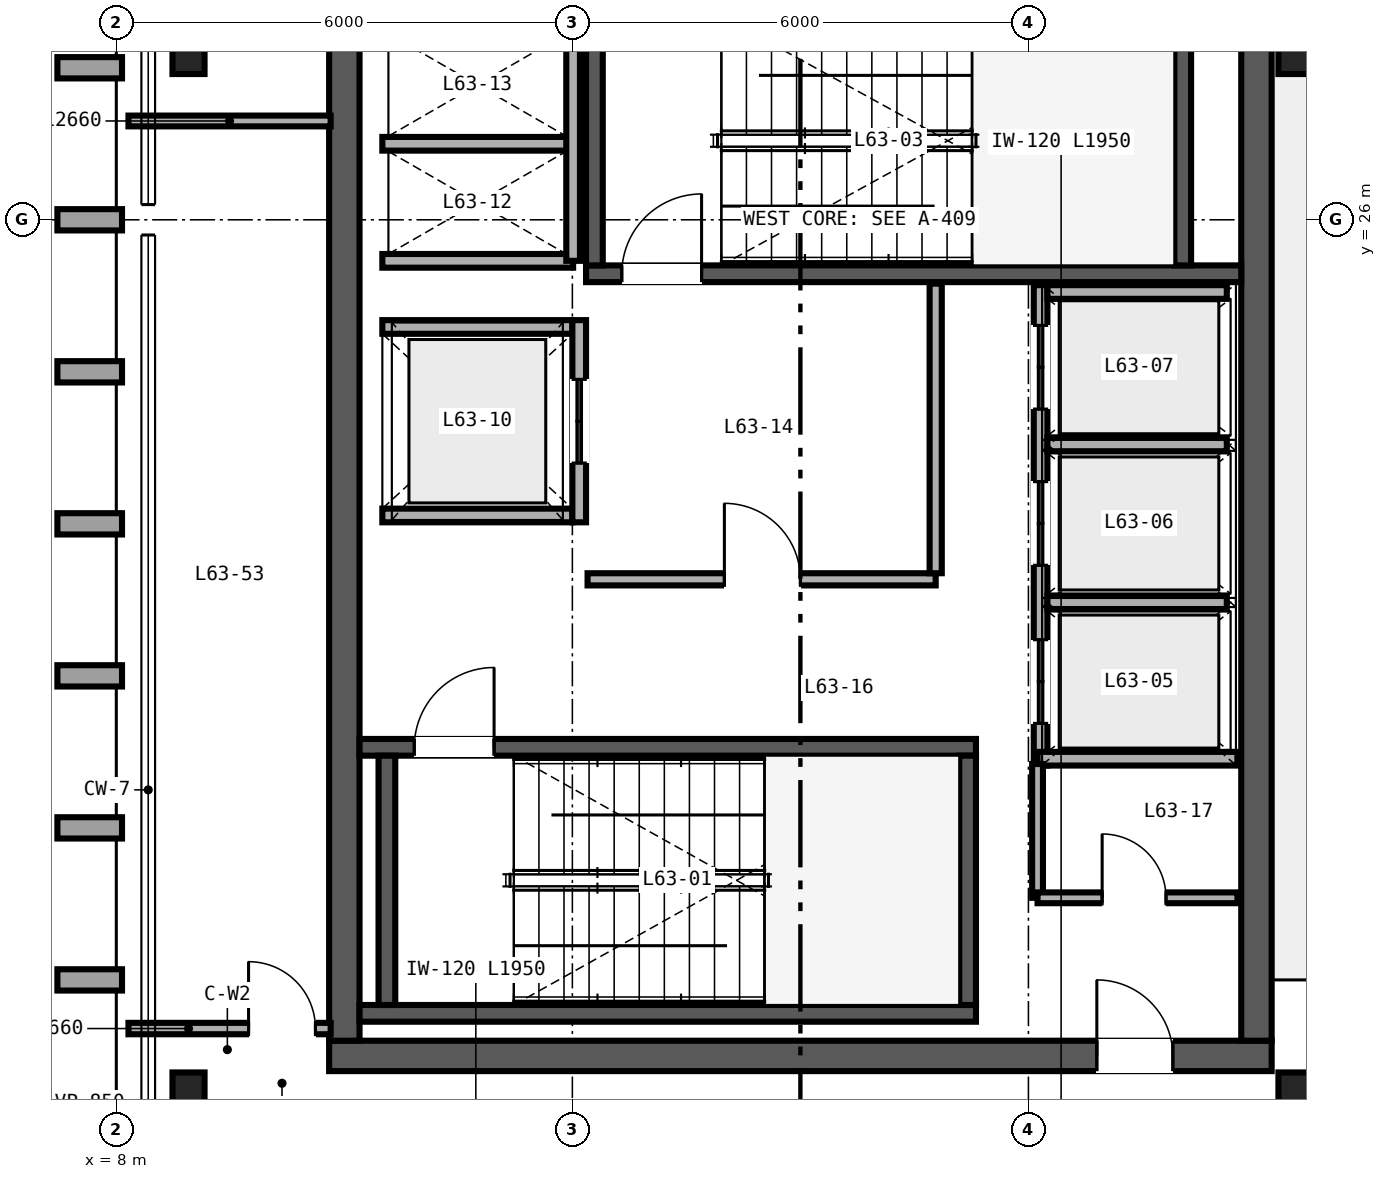
"""IFC4 building model, lengths in metres.
Left out: names, types, materials, properties, quantities, classifications, styles, units other than length and angle.
Written with IfcOpenShell. Run it as: python <this file> out.ifc"""

import sys

from ifc_helpers import new_model, si_unit, direction, frame, frame_2d, origin, origin_2d, place, context, subcontext, project, spatial, rectangle, i_section, extrude, source, transform, mapped, element, fill, save


model = new_model("IFC4")
c1 = context("Model", 3, precision=1e-05, world=origin(), true_north=direction((0.0, 1.0)))
c2 = subcontext(c1, "Body", "Model", "MODEL_VIEW")
j1 = project(units=[si_unit("LENGTHUNIT", "METRE"), si_unit("PLANEANGLEUNIT", "RADIAN")], contexts=[c1])
p1 = place(None, origin())
s1 = spatial("IfcSite", under=j1, at=p1, CompositionType="ELEMENT")
p2 = place(p1, origin())
s2 = spatial("IfcBuilding", under=s1, at=p2, CompositionType="ELEMENT")
p3 = place(p2, frame((0.0, 0.0, 250.8)))
s3 = spatial("IfcBuildingStorey", under=s2, at=p3, CompositionType="ELEMENT", Elevation=250.8)
p4 = place(p3, frame((10.8, 15.0, 0.0), z_axis=(0.0, 0.0, 1.0), x_axis=(1.0, 0.0, 0.0)))
e1 = element("IfcWall", 1, at=p4, inside=s3, PredefinedType="SHEAR", context=c2, shape_type="SweptSolid", body=[
    extrude(rectangle(XDim=12.4, YDim=0.4, at=frame_2d((6.2, 0.0))), origin(), (0.0, 0.0, 1.0), 3.38),
])
p5 = place(p4, frame((10.1, 0.0, 0.0)))
e2 = element("IfcOpeningElement", 2, at=p5, cuts=e1, PredefinedType="OPENING", context=c2, shape_type="SweptSolid", body=[
    extrude(rectangle(XDim=1.0, YDim=2.15, at=frame_2d((0.5, 1.075))), frame((0.0, 0.21, 0.0), z_axis=(0.0, -1.0, 0.0), x_axis=(1.0, 0.0, 0.0)), (0.0, 0.0, 1.0), 0.42),
])
for number, where, z_axis, x_axis in (
    (3, (11.0, 15.2, 0.0), (0.0, 0.0, 1.0), (0.0, 1.0, 0.0)),
    (4, (23.0, 15.2, 0.0), (0.0, 0.0, 1.0), (0.0, 1.0, 0.0)),
):
    element("IfcWall", number, at=place(p3, frame(where, z_axis=z_axis, x_axis=x_axis)), inside=s3, PredefinedType="SHEAR", context=c2, shape_type="SweptSolid", body=[
        extrude(rectangle(XDim=21.6, YDim=0.4, at=frame_2d((10.8, 0.0))), origin(), (0.0, 0.0, 1.0), 3.38),
    ])
p6 = place(p3, frame((11.2, 15.56, 0.0), z_axis=(0.0, 0.0, 1.0), x_axis=(1.0, 0.0, 0.0)))
e5 = element("IfcWall", 5, at=p6, inside=s3, PredefinedType="SHEAR", context=c2, shape_type="SweptSolid", body=[
    extrude(rectangle(XDim=8.11, YDim=0.22, at=frame_2d((4.055, 0.0))), origin(), (0.0, 0.0, 1.0), 3.4),
])
p7 = place(p3, frame((11.2, 19.06, 0.0), z_axis=(0.0, 0.0, 1.0), x_axis=(1.0, 0.0, 0.0)))
e6 = element("IfcWall", 6, at=p7, inside=s3, PredefinedType="SHEAR", context=c2, shape_type="SweptSolid", body=[
    extrude(rectangle(XDim=8.11, YDim=0.22, at=frame_2d((4.055, 0.0))), origin(), (0.0, 0.0, 1.0), 3.4),
])
p8 = place(p7, frame((0.72, 0.0, 0.0)))
e7 = element("IfcOpeningElement", 7, at=p8, cuts=e6, PredefinedType="OPENING", context=c2, shape_type="SweptSolid", body=[
    extrude(rectangle(XDim=1.05, YDim=2.15, at=frame_2d((0.525, 1.075))), frame((0.0, 0.12, 0.0), z_axis=(0.0, -1.0, 0.0), x_axis=(1.0, 0.0, 0.0)), (0.0, 0.0, 1.0), 0.24),
])
for number, where, z_axis, x_axis in (
    (8, (11.56, 15.67, 0.0), (0.0, 0.0, 1.0), (0.0, 1.0, 0.0)),
    (9, (19.2, 15.67, 0.0), (0.0, 0.0, 1.0), (0.0, 1.0, 0.0)),
):
    element("IfcWall", number, at=place(p3, frame(where, z_axis=z_axis, x_axis=x_axis)), inside=s3, PredefinedType="SHEAR", context=c2, shape_type="SweptSolid", body=[
        extrude(rectangle(XDim=3.28, YDim=0.22, at=frame_2d((1.64, 0.0))), origin(), (0.0, 0.0, 1.0), 3.4),
    ])
p9 = place(p3, frame((14.18, 25.29, 0.0), z_axis=(0.0, 0.0, 1.0), x_axis=(1.0, 0.0, 0.0)))
e10 = element("IfcWall", 10, at=p9, inside=s3, PredefinedType="SHEAR", context=c2, shape_type="SweptSolid", body=[
    extrude(rectangle(XDim=8.62, YDim=0.22, at=frame_2d((4.31, 0.0))), origin(), (0.0, 0.0, 1.0), 3.4),
])
p10 = place(p9, frame((0.47, 0.0, 0.0)))
e11 = element("IfcOpeningElement", 11, at=p10, cuts=e10, PredefinedType="OPENING", context=c2, shape_type="SweptSolid", body=[
    extrude(rectangle(XDim=1.05, YDim=2.15, at=frame_2d((0.525, 1.075))), frame((0.0, 0.12, 0.0), z_axis=(0.0, -1.0, 0.0), x_axis=(1.0, 0.0, 0.0)), (0.0, 0.0, 1.0), 0.24),
])
for number, where, z_axis, x_axis in (
    (12, (14.29, 25.4, 0.0), (0.0, 0.0, 1.0), (0.0, 1.0, 0.0)),
    (13, (22.03, 25.4, 0.0), (0.0, 0.0, 1.0), (0.0, 1.0, 0.0)),
):
    element("IfcWall", number, at=place(p3, frame(where, z_axis=z_axis, x_axis=x_axis)), inside=s3, PredefinedType="SHEAR", context=c2, shape_type="SweptSolid", body=[
        extrude(rectangle(XDim=3.28, YDim=0.22, at=frame_2d((1.64, 0.0))), origin(), (0.0, 0.0, 1.0), 3.4),
    ])
m1 = source(origin(), c2, "Body", "SweptSolid", [
    extrude(i_section(OverallWidth=0.422, OverallDepth=0.465, WebThickness=0.045, FlangeThickness=0.073, FilletRadius=0.025, at=origin_2d()), origin(), (0.0, 0.0, 1.0), 3.38),
])
for number, where, z_axis, x_axis in (
    (14, (8.95, 14.55, 0.0), (0.0, 0.0, 1.0), (1.0, 0.0, 0.0)),
    (15, (23.5, 14.55, 0.0), (0.0, 0.0, 1.0), (1.0, 0.0, 0.0)),
    (16, (8.95, 28.15, 0.0), (0.0, 0.0, 1.0), (1.0, 0.0, 0.0)),
    (17, (23.5, 28.15, 0.0), (0.0, 0.0, 1.0), (1.0, 0.0, 0.0)),
):
    element("IfcColumn", number, at=place(p3, frame(where, z_axis=z_axis, x_axis=x_axis)), inside=s3, PredefinedType="COLUMN", context=c2, shape_type="MappedRepresentation", body=[
        mapped(m1, transform((0.0, 0.0, 0.0), scale=1.0)),
    ])
p11 = place(p3, frame((20.16, 18.82, 0.0), z_axis=(0.0, 0.0, 1.0), x_axis=(0.0, 1.0, 0.0)))
e18 = element("IfcWall", 18, at=p11, inside=s3, PredefinedType="SOLIDWALL", context=c2, shape_type="SweptSolid", body=[
    extrude(rectangle(XDim=6.32, YDim=0.18, at=frame_2d((3.16, 0.0))), origin(), (0.0, 0.0, 1.0), 2.48),
])
p12 = place(p11, frame((0.555, 0.0, 0.0)))
e19 = element("IfcOpeningElement", 19, at=p12, cuts=e18, PredefinedType="OPENING", context=c2, shape_type="SweptSolid", body=[
    extrude(rectangle(XDim=1.1, YDim=2.2, at=frame_2d((0.55, 1.1))), frame((0.0, 0.1, 0.0), z_axis=(0.0, -1.0, 0.0), x_axis=(1.0, 0.0, 0.0)), (0.0, 0.0, 1.0), 0.2),
])
p13 = place(p11, frame((2.635, 0.0, 0.0)))
e20 = element("IfcOpeningElement", 20, at=p13, cuts=e18, PredefinedType="OPENING", context=c2, shape_type="SweptSolid", body=[
    extrude(rectangle(XDim=1.1, YDim=2.2, at=frame_2d((0.55, 1.1))), frame((0.0, 0.1, 0.0), z_axis=(0.0, -1.0, 0.0), x_axis=(1.0, 0.0, 0.0)), (0.0, 0.0, 1.0), 0.2),
])
p14 = place(p11, frame((4.69, 0.0, 0.0)))
e21 = element("IfcOpeningElement", 21, at=p14, cuts=e18, PredefinedType="OPENING", context=c2, shape_type="SweptSolid", body=[
    extrude(rectangle(XDim=1.1, YDim=2.2, at=frame_2d((0.55, 1.1))), frame((0.0, 0.1, 0.0), z_axis=(0.0, -1.0, 0.0), x_axis=(1.0, 0.0, 0.0)), (0.0, 0.0, 1.0), 0.2),
])
p15 = place(p3, frame((20.12, 18.91, 0.0), z_axis=(0.0, 0.0, 1.0), x_axis=(1.0, 0.0, 0.0)))
e22 = element("IfcWall", 22, at=p15, inside=s3, PredefinedType="SOLIDWALL", context=c2, shape_type="SweptSolid", body=[
    extrude(rectangle(XDim=2.63, YDim=0.18, at=frame_2d((1.315, 0.0))), origin(), (0.0, 0.0, 1.0), 3.38),
])
p16 = place(p3, frame((20.25, 25.05, 0.0), z_axis=(0.0, 0.0, 1.0), x_axis=(1.0, 0.0, 0.0)))
e23 = element("IfcWall", 23, at=p16, inside=s3, PredefinedType="SOLIDWALL", context=c2, shape_type="SweptSolid", body=[
    extrude(rectangle(XDim=2.36, YDim=0.18, at=frame_2d((1.18, 0.0))), origin(), (0.0, 0.0, 1.0), 3.38),
])
p17 = place(p3, frame((20.25, 20.965, 0.0), z_axis=(0.0, 0.0, 1.0), x_axis=(1.0, 0.0, 0.0)))
e24 = element("IfcWall", 24, at=p17, inside=s3, PredefinedType="SOLIDWALL", context=c2, shape_type="SweptSolid", body=[
    extrude(rectangle(XDim=2.36, YDim=0.18, at=frame_2d((1.18, 0.0))), origin(), (0.0, 0.0, 1.0), 2.48),
])
p18 = place(p3, frame((20.25, 23.045, 0.0), z_axis=(0.0, 0.0, 1.0), x_axis=(1.0, 0.0, 0.0)))
e25 = element("IfcWall", 25, at=p18, inside=s3, PredefinedType="SOLIDWALL", context=c2, shape_type="SweptSolid", body=[
    extrude(rectangle(XDim=2.36, YDim=0.18, at=frame_2d((1.18, 0.0))), origin(), (0.0, 0.0, 1.0), 3.38),
])
for number, where, z_axis, x_axis in (
    (26, (11.5, 22.11, 0.0), (0.0, 0.0, 1.0), (1.0, 0.0, 0.0)),
    (27, (11.5, 24.59, 0.0), (0.0, 0.0, 1.0), (1.0, 0.0, 0.0)),
):
    element("IfcWall", number, at=place(p3, frame(where, z_axis=z_axis, x_axis=x_axis)), inside=s3, PredefinedType="SOLIDWALL", context=c2, shape_type="SweptSolid", body=[
        extrude(rectangle(XDim=2.5, YDim=0.18, at=frame_2d((1.25, 0.0))), origin(), (0.0, 0.0, 1.0), 3.38),
    ])
p19 = place(p3, frame((14.09, 22.02, 0.0), z_axis=(0.0, 0.0, 1.0), x_axis=(0.0, 1.0, 0.0)))
e28 = element("IfcWall", 28, at=p19, inside=s3, PredefinedType="SOLIDWALL", context=c2, shape_type="SweptSolid", body=[
    extrude(rectangle(XDim=2.66, YDim=0.18, at=frame_2d((1.33, 0.0))), origin(), (0.0, 0.0, 1.0), 3.38),
])
p20 = place(p19, frame((0.78, 0.0, 0.0)))
e29 = element("IfcOpeningElement", 29, at=p20, cuts=e28, PredefinedType="OPENING", context=c2, shape_type="SweptSolid", body=[
    extrude(rectangle(XDim=1.1, YDim=2.2, at=frame_2d((0.55, 1.1))), frame((0.0, 0.1, 0.0), z_axis=(0.0, -1.0, 0.0), x_axis=(1.0, 0.0, 0.0)), (0.0, 0.0, 1.0), 0.2),
])
for number, where, z_axis, x_axis in (
    (30, (11.5, 25.46, 0.0), (0.0, 0.0, 1.0), (1.0, 0.0, 0.0)),
    (31, (11.5, 27.0, 0.0), (0.0, 0.0, 1.0), (1.0, 0.0, 0.0)),
):
    element("IfcWall", number, at=place(p3, frame(where, z_axis=z_axis, x_axis=x_axis)), inside=s3, PredefinedType="SOLIDWALL", context=c2, shape_type="SweptSolid", body=[
        extrude(rectangle(XDim=2.51, YDim=0.18, at=frame_2d((1.255, 0.0))), origin(), (0.0, 0.0, 1.0), 3.38),
    ])
p21 = place(p3, frame((14.01, 25.46, 0.0), z_axis=(0.0, 0.0, 1.0), x_axis=(0.0, 1.0, 0.0)))
e32 = element("IfcWall", 32, at=p21, inside=s3, PredefinedType="SOLIDWALL", context=c2, shape_type="SweptSolid", body=[
    extrude(rectangle(XDim=3.08, YDim=0.18, at=frame_2d((1.54, 0.0))), origin(), (0.0, 0.0, 1.0), 3.38),
])
p22 = place(p3, frame((14.2, 21.27, 0.0), z_axis=(0.0, 0.0, 1.0), x_axis=(1.0, 0.0, 0.0)))
e33 = element("IfcWall", 33, at=p22, inside=s3, PredefinedType="PARTITIONING", context=c2, shape_type="SweptSolid", body=[
    extrude(rectangle(XDim=4.58, YDim=0.16, at=frame_2d((2.29, 0.0))), origin(), (0.0, 0.0, 1.0), 3.38),
])
p23 = place(p22, frame((1.8, 0.0, 0.0)))
e34 = element("IfcOpeningElement", 34, at=p23, cuts=e33, PredefinedType="OPENING", context=c2, shape_type="SweptSolid", body=[
    extrude(rectangle(XDim=1.0, YDim=2.15, at=frame_2d((0.5, 1.075))), frame((0.0, 0.09, 0.0), z_axis=(0.0, -1.0, 0.0), x_axis=(1.0, 0.0, 0.0)), (0.0, 0.0, 1.0), 0.18),
])
p24 = place(p3, frame((18.78, 21.35, 0.0), z_axis=(0.0, 0.0, 1.0), x_axis=(0.0, 1.0, 0.0)))
e35 = element("IfcWall", 35, at=p24, inside=s3, PredefinedType="PARTITIONING", context=c2, shape_type="SweptSolid", body=[
    extrude(rectangle(XDim=3.81, YDim=0.16, at=frame_2d((1.905, 0.0))), origin(), (0.0, 0.0, 1.0), 3.38),
])
p25 = place(p3, frame((20.12, 17.08, 0.0), z_axis=(0.0, 0.0, 1.0), x_axis=(0.0, 1.0, 0.0)))
e36 = element("IfcWall", 36, at=p25, inside=s3, PredefinedType="PARTITIONING", context=c2, shape_type="SweptSolid", body=[
    extrude(rectangle(XDim=1.76, YDim=0.142, at=frame_2d((0.88, 0.0))), origin(), (0.0, 0.0, 1.0), 3.38),
])
p26 = place(p3, frame((20.12, 17.08, 0.0), z_axis=(0.0, 0.0, 1.0), x_axis=(1.0, 0.0, 0.0)))
e37 = element("IfcWall", 37, at=p26, inside=s3, PredefinedType="PARTITIONING", context=c2, shape_type="SweptSolid", body=[
    extrude(rectangle(XDim=2.63, YDim=0.142, at=frame_2d((1.315, 0.0))), origin(), (0.0, 0.0, 1.0), 3.38),
])
p27 = place(p26, frame((0.85, 0.0, 0.0)))
e38 = element("IfcOpeningElement", 38, at=p27, cuts=e37, PredefinedType="OPENING", context=c2, shape_type="SweptSolid", body=[
    extrude(rectangle(XDim=0.84, YDim=2.1, at=frame_2d((0.42, 1.05))), frame((0.0, 0.081, 0.0), z_axis=(0.0, -1.0, 0.0), x_axis=(1.0, 0.0, 0.0)), (0.0, 0.0, 1.0), 0.162),
])
p28 = place(p3, frame((8.16, 15.36, 0.0), z_axis=(0.0, 0.0, 1.0), x_axis=(1.0, 0.0, 0.0)))
e39 = element("IfcWall", 39, at=p28, inside=s3, PredefinedType="PARTITIONING", context=c2, shape_type="SweptSolid", body=[
    extrude(rectangle(XDim=2.66, YDim=0.15, at=frame_2d((1.33, 0.0))), origin(), (0.0, 0.0, 1.0), 2.601),
])
p29 = place(p28, frame((1.58, 0.0, 0.0)))
e40 = element("IfcOpeningElement", 40, at=p29, cuts=e39, PredefinedType="OPENING", context=c2, shape_type="SweptSolid", body=[
    extrude(rectangle(XDim=0.88, YDim=2.15, at=frame_2d((0.44, 1.075))), frame((0.0, 0.085, 0.0), z_axis=(0.0, -1.0, 0.0), x_axis=(1.0, 0.0, 0.0)), (0.0, 0.0, 1.0), 0.17),
])
p30 = place(p3, frame((8.16, 27.3, 0.0), z_axis=(0.0, 0.0, 1.0), x_axis=(1.0, 0.0, 0.0)))
e41 = element("IfcWall", 41, at=p30, inside=s3, PredefinedType="PARTITIONING", context=c2, shape_type="SweptSolid", body=[
    extrude(rectangle(XDim=2.66, YDim=0.142, at=frame_2d((1.33, 0.0))), origin(), (0.0, 0.0, 1.0), 2.601),
])
m2 = source(origin(), c2, "Body", "SweptSolid", [
    extrude(rectangle(XDim=1.05, YDim=2.15, at=frame_2d((0.525, 1.075))), frame((0.0, 0.025, 0.0), z_axis=(0.0, -1.0, 0.0), x_axis=(1.0, 0.0, 0.0)), (0.0, 0.0, 1.0), 0.05),
])
p31 = place(p8, origin())
e42 = element("IfcDoor", 42, at=p31, inside=s3, OperationType="SINGLE_SWING_RIGHT", PredefinedType="DOOR", context=c2, shape_type="MappedRepresentation", body=[
    mapped(m2, transform((0.0, 0.0, 0.0), scale=1.0)),
])
fill(e7, e42)
p32 = place(p10, origin())
e43 = element("IfcDoor", 43, at=p32, inside=s3, OperationType="SINGLE_SWING_RIGHT", PredefinedType="DOOR", context=c2, shape_type="MappedRepresentation", body=[
    mapped(m2, transform((0.0, 0.0, 0.0), scale=1.0)),
])
fill(e11, e43)
m3 = source(origin(), c2, "Body", "SweptSolid", [
    extrude(rectangle(XDim=1.1, YDim=2.2, at=frame_2d((0.55, 1.1))), frame((0.0, 0.025, 0.0), z_axis=(0.0, -1.0, 0.0), x_axis=(1.0, 0.0, 0.0)), (0.0, 0.0, 1.0), 0.05),
])
p33 = place(p12, origin())
e44 = element("IfcDoor", 44, at=p33, inside=s3, OperationType="DOUBLE_DOOR_SLIDING", PredefinedType="DOOR", context=c2, shape_type="MappedRepresentation", body=[
    mapped(m3, transform((0.0, 0.0, 0.0), scale=1.0)),
])
fill(e19, e44)
p34 = place(p13, origin())
e45 = element("IfcDoor", 45, at=p34, inside=s3, OperationType="DOUBLE_DOOR_SLIDING", PredefinedType="DOOR", context=c2, shape_type="MappedRepresentation", body=[
    mapped(m3, transform((0.0, 0.0, 0.0), scale=1.0)),
])
fill(e20, e45)
p35 = place(p14, origin())
e46 = element("IfcDoor", 46, at=p35, inside=s3, OperationType="DOUBLE_DOOR_SLIDING", PredefinedType="DOOR", context=c2, shape_type="MappedRepresentation", body=[
    mapped(m3, transform((0.0, 0.0, 0.0), scale=1.0)),
])
fill(e21, e46)
p36 = place(p20, origin())
e47 = element("IfcDoor", 47, at=p36, inside=s3, OperationType="DOUBLE_DOOR_SLIDING", PredefinedType="DOOR", context=c2, shape_type="MappedRepresentation", body=[
    mapped(m3, transform((0.0, 0.0, 0.0), scale=1.0)),
])
fill(e29, e47)
m4 = source(origin(), c2, "Body", "SweptSolid", [
    extrude(rectangle(XDim=1.0, YDim=2.15, at=frame_2d((0.5, 1.075))), frame((0.0, 0.025, 0.0), z_axis=(0.0, -1.0, 0.0), x_axis=(1.0, 0.0, 0.0)), (0.0, 0.0, 1.0), 0.05),
])
p37 = place(p23, origin())
e48 = element("IfcDoor", 48, at=p37, inside=s3, OperationType="SINGLE_SWING_LEFT", PredefinedType="DOOR", context=c2, shape_type="MappedRepresentation", body=[
    mapped(m4, transform((0.0, 0.0, 0.0), scale=1.0)),
])
fill(e34, e48)
m5 = source(origin(), c2, "Body", "SweptSolid", [
    extrude(rectangle(XDim=0.84, YDim=2.1, at=frame_2d((0.42, 1.05))), frame((0.0, 0.025, 0.0), z_axis=(0.0, -1.0, 0.0), x_axis=(1.0, 0.0, 0.0)), (0.0, 0.0, 1.0), 0.05),
])
p38 = place(p27, origin())
e49 = element("IfcDoor", 49, at=p38, inside=s3, OperationType="SINGLE_SWING_LEFT", PredefinedType="DOOR", context=c2, shape_type="MappedRepresentation", body=[
    mapped(m5, transform((0.0, 0.0, 0.0), scale=1.0)),
])
fill(e38, e49)
p39 = place(p5, origin())
e50 = element("IfcDoor", 50, at=p39, inside=s3, OperationType="SINGLE_SWING_LEFT", PredefinedType="DOOR", context=c2, shape_type="MappedRepresentation", body=[
    mapped(m4, transform((0.0, 0.0, 0.0), scale=1.0)),
])
fill(e2, e50)
m6 = source(origin(), c2, "Body", "SweptSolid", [
    extrude(rectangle(XDim=0.88, YDim=2.15, at=frame_2d((0.44, 1.075))), frame((0.0, 0.025, 0.0), z_axis=(0.0, -1.0, 0.0), x_axis=(1.0, 0.0, 0.0)), (0.0, 0.0, 1.0), 0.05),
])
p40 = place(p29, origin())
e51 = element("IfcDoor", 51, at=p40, inside=s3, OperationType="SINGLE_SWING_LEFT", PredefinedType="DOOR", context=c2, shape_type="MappedRepresentation", body=[
    mapped(m6, transform((0.0, 0.0, 0.0), scale=1.0)),
])
fill(e40, e51)
save(model, sys.argv[1])
